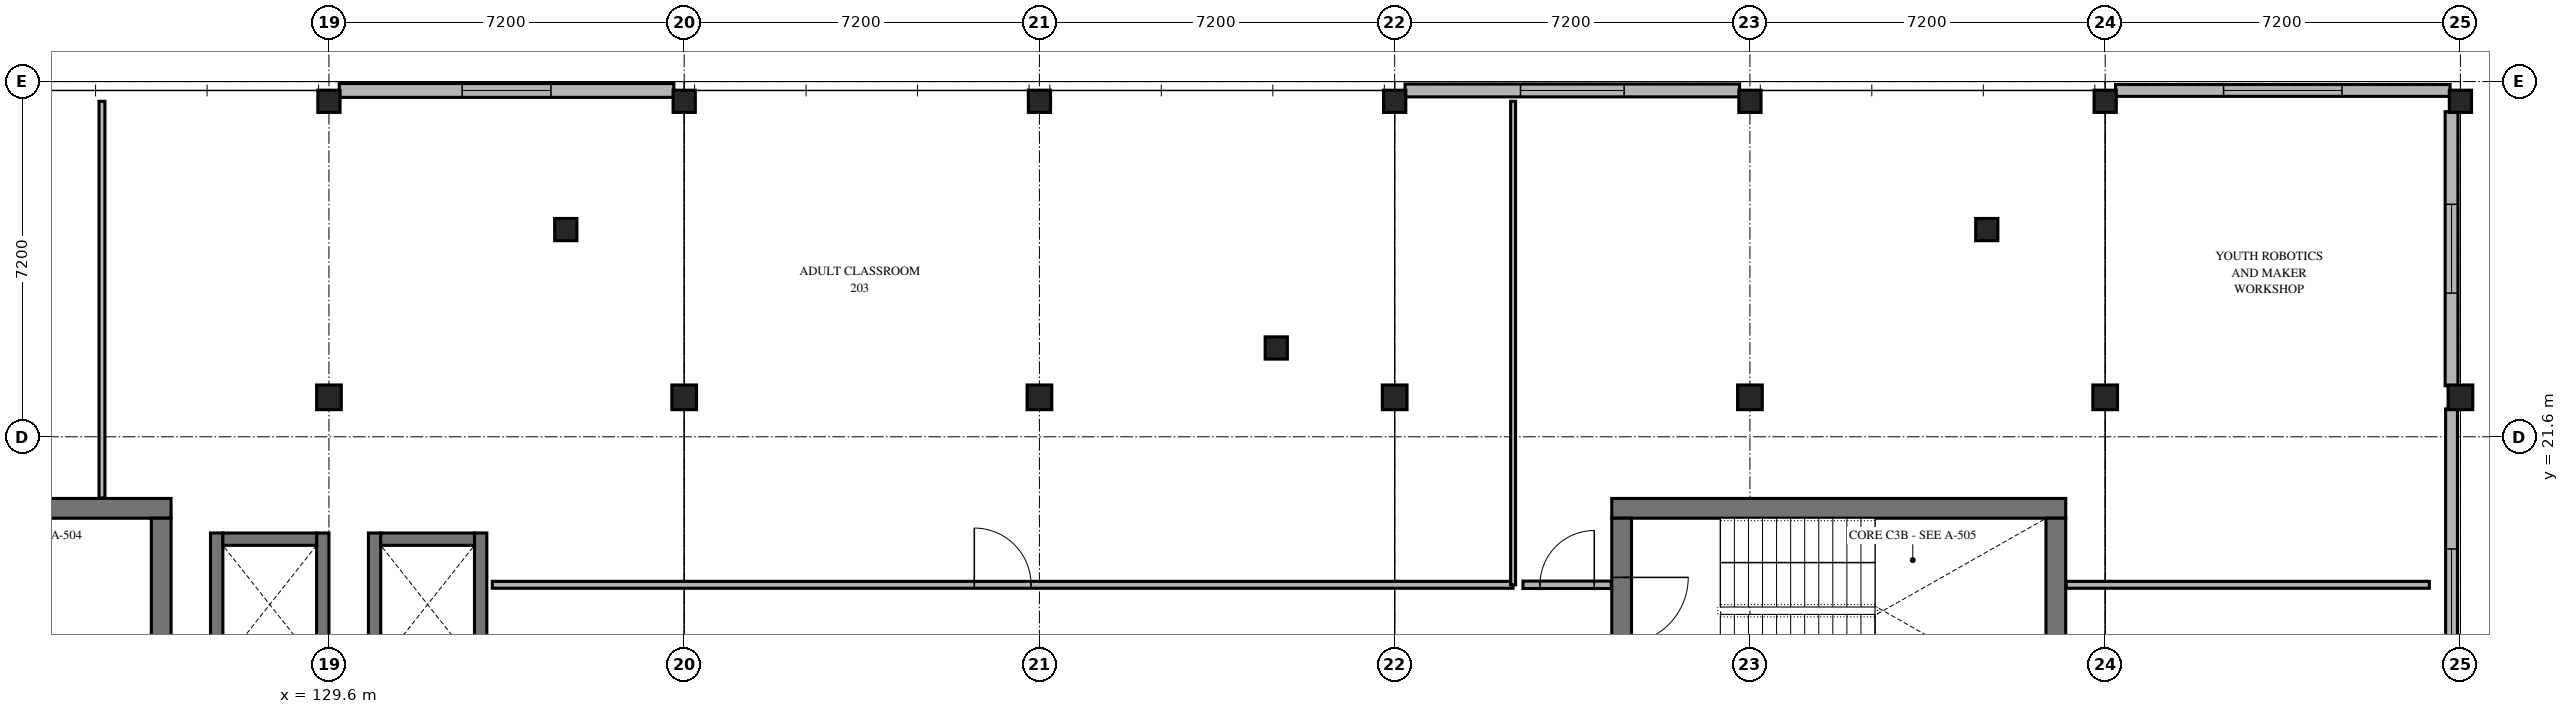
"""IFC4 building model, lengths in metres.
Left out: names, types, materials, properties, quantities, classifications, styles, units other than length and angle.
Written with IfcOpenShell. Run it as: python <this file> out.ifc"""

import sys

from ifc_helpers import new_model, si_unit, direction, frame, frame_2d, origin, origin_2d, place, context, subcontext, project, spatial, rectangle, extrude, element, fill, save


model = new_model("IFC4")
c1 = context("Model", 3, precision=1e-05, world=origin(), true_north=direction((0.0, 1.0)))
c2 = subcontext(c1, "Body", "Model", "MODEL_VIEW")
j1 = project(units=[si_unit("LENGTHUNIT", "METRE"), si_unit("PLANEANGLEUNIT", "RADIAN")], contexts=[c1])
p1 = place(None, origin())
s1 = spatial("IfcSite", under=j1, at=p1, CompositionType="ELEMENT")
p2 = place(p1, origin())
s2 = spatial("IfcBuilding", under=s1, at=p2, CompositionType="ELEMENT")
p3 = place(p2, frame((0.0, 0.0, 8.7)))
s3 = spatial("IfcBuildingStorey", under=s2, at=p3, CompositionType="ELEMENT", Elevation=8.7)
p4 = place(p3, frame((129.6, 22.4, 0.0), z_axis=(0.0, 0.0, 1.0), x_axis=(1.0, 0.0, 0.0)))
e1 = element("IfcColumn", 1, at=p4, inside=s3, PredefinedType="COLUMN", context=c2, shape_type="SweptSolid", body=[
    extrude(rectangle(XDim=0.5, YDim=0.5, at=origin_2d()), origin(), (0.0, 0.0, 1.0), 4.2),
])
p5 = place(p3, frame((129.6, 28.4, 0.0), z_axis=(0.0, 0.0, 1.0), x_axis=(1.0, 0.0, 0.0)))
e2 = element("IfcColumn", 2, at=p5, inside=s3, PredefinedType="COLUMN", context=c2, shape_type="SweptSolid", body=[
    extrude(rectangle(XDim=0.45, YDim=0.45, at=origin_2d()), origin(), (0.0, 0.0, 1.0), 4.2),
])
p6 = place(p3, frame((136.8, 22.4, 0.0), z_axis=(0.0, 0.0, 1.0), x_axis=(1.0, 0.0, 0.0)))
e3 = element("IfcColumn", 3, at=p6, inside=s3, PredefinedType="COLUMN", context=c2, shape_type="SweptSolid", body=[
    extrude(rectangle(XDim=0.5, YDim=0.5, at=origin_2d()), origin(), (0.0, 0.0, 1.0), 4.2),
])
p7 = place(p3, frame((136.8, 28.4, 0.0), z_axis=(0.0, 0.0, 1.0), x_axis=(1.0, 0.0, 0.0)))
e4 = element("IfcColumn", 4, at=p7, inside=s3, PredefinedType="COLUMN", context=c2, shape_type="SweptSolid", body=[
    extrude(rectangle(XDim=0.45, YDim=0.45, at=origin_2d()), origin(), (0.0, 0.0, 1.0), 4.2),
])
p8 = place(p3, frame((144.0, 22.4, 0.0), z_axis=(0.0, 0.0, 1.0), x_axis=(1.0, 0.0, 0.0)))
e5 = element("IfcColumn", 5, at=p8, inside=s3, PredefinedType="COLUMN", context=c2, shape_type="SweptSolid", body=[
    extrude(rectangle(XDim=0.5, YDim=0.5, at=origin_2d()), origin(), (0.0, 0.0, 1.0), 4.2),
])
p9 = place(p3, frame((144.0, 28.4, 0.0), z_axis=(0.0, 0.0, 1.0), x_axis=(1.0, 0.0, 0.0)))
e6 = element("IfcColumn", 6, at=p9, inside=s3, PredefinedType="COLUMN", context=c2, shape_type="SweptSolid", body=[
    extrude(rectangle(XDim=0.45, YDim=0.45, at=origin_2d()), origin(), (0.0, 0.0, 1.0), 4.2),
])
p10 = place(p3, frame((151.2, 22.4, 0.0), z_axis=(0.0, 0.0, 1.0), x_axis=(1.0, 0.0, 0.0)))
e7 = element("IfcColumn", 7, at=p10, inside=s3, PredefinedType="COLUMN", context=c2, shape_type="SweptSolid", body=[
    extrude(rectangle(XDim=0.5, YDim=0.5, at=origin_2d()), origin(), (0.0, 0.0, 1.0), 4.2),
])
p11 = place(p3, frame((151.2, 28.4, 0.0), z_axis=(0.0, 0.0, 1.0), x_axis=(1.0, 0.0, 0.0)))
e8 = element("IfcColumn", 8, at=p11, inside=s3, PredefinedType="COLUMN", context=c2, shape_type="SweptSolid", body=[
    extrude(rectangle(XDim=0.45, YDim=0.45, at=origin_2d()), origin(), (0.0, 0.0, 1.0), 4.2),
])
p12 = place(p3, frame((158.4, 22.4, 0.0), z_axis=(0.0, 0.0, 1.0), x_axis=(1.0, 0.0, 0.0)))
e9 = element("IfcColumn", 9, at=p12, inside=s3, PredefinedType="COLUMN", context=c2, shape_type="SweptSolid", body=[
    extrude(rectangle(XDim=0.5, YDim=0.5, at=origin_2d()), origin(), (0.0, 0.0, 1.0), 4.2),
])
p13 = place(p3, frame((158.4, 28.4, 0.0), z_axis=(0.0, 0.0, 1.0), x_axis=(1.0, 0.0, 0.0)))
e10 = element("IfcColumn", 10, at=p13, inside=s3, PredefinedType="COLUMN", context=c2, shape_type="SweptSolid", body=[
    extrude(rectangle(XDim=0.45, YDim=0.45, at=origin_2d()), origin(), (0.0, 0.0, 1.0), 4.2),
])
p14 = place(p3, frame((165.6, 22.4, 0.0), z_axis=(0.0, 0.0, 1.0), x_axis=(1.0, 0.0, 0.0)))
e11 = element("IfcColumn", 11, at=p14, inside=s3, PredefinedType="COLUMN", context=c2, shape_type="SweptSolid", body=[
    extrude(rectangle(XDim=0.5, YDim=0.5, at=origin_2d()), origin(), (0.0, 0.0, 1.0), 4.2),
])
p15 = place(p3, frame((165.6, 28.4, 0.0), z_axis=(0.0, 0.0, 1.0), x_axis=(1.0, 0.0, 0.0)))
e12 = element("IfcColumn", 12, at=p15, inside=s3, PredefinedType="COLUMN", context=c2, shape_type="SweptSolid", body=[
    extrude(rectangle(XDim=0.45, YDim=0.45, at=origin_2d()), origin(), (0.0, 0.0, 1.0), 4.2),
])
p16 = place(p3, frame((172.8, 22.4, 0.0), z_axis=(0.0, 0.0, 1.0), x_axis=(1.0, 0.0, 0.0)))
e13 = element("IfcColumn", 13, at=p16, inside=s3, PredefinedType="COLUMN", context=c2, shape_type="SweptSolid", body=[
    extrude(rectangle(XDim=0.5, YDim=0.5, at=origin_2d()), origin(), (0.0, 0.0, 1.0), 4.2),
])
for number, where, z_axis, x_axis in (
    (14, (172.8, 28.4, 0.0), (0.0, 0.0, 1.0), (1.0, 0.0, 0.0)),
    (15, (134.4, 25.8, 0.0), (0.0, 0.0, 1.0), (1.0, 0.0, 0.0)),
    (16, (148.8, 23.4, 0.0), (0.0, 0.0, 1.0), (1.0, 0.0, 0.0)),
    (17, (163.2, 25.8, 0.0), (0.0, 0.0, 1.0), (1.0, 0.0, 0.0)),
):
    element("IfcColumn", number, at=place(p3, frame(where, z_axis=z_axis, x_axis=x_axis)), inside=s3, PredefinedType="COLUMN", context=c2, shape_type="SweptSolid", body=[
        extrude(rectangle(XDim=0.45, YDim=0.45, at=origin_2d()), origin(), (0.0, 0.0, 1.0), 4.2),
    ])
p17 = place(p3, frame((172.62, 28.19, 0.0), z_axis=(0.0, 0.0, 1.0), x_axis=(0.0, -1.0, 0.0)))
e18 = element("IfcWall", 18, at=p17, inside=s3, PredefinedType="SOLIDWALL", context=c2, shape_type="SweptSolid", body=[
    extrude(rectangle(XDim=5.555, YDim=0.26, at=frame_2d((2.777, 0.0))), origin(), (0.0, 0.0, 1.0), 3.26),
])
p18 = place(p17, frame((1.877, 0.0, 0.9)))
e19 = element("IfcOpeningElement", 19, at=p18, cuts=e18, PredefinedType="OPENING", context=c2, shape_type="SweptSolid", body=[
    extrude(rectangle(XDim=1.8, YDim=1.2, at=frame_2d((0.9, 0.6))), frame((0.0, 0.14, 0.0), z_axis=(0.0, -1.0, 0.0), x_axis=(1.0, 0.0, 0.0)), (0.0, 0.0, 1.0), 0.28),
])
p19 = place(p3, frame((172.62, 22.165, 0.0), z_axis=(0.0, 0.0, 1.0), x_axis=(0.0, -1.0, 0.0)))
e20 = element("IfcWall", 20, at=p19, inside=s3, PredefinedType="SOLIDWALL", context=c2, shape_type="SweptSolid", body=[
    extrude(rectangle(XDim=7.777, YDim=0.24, at=frame_2d((3.889, 0.0))), origin(), (0.0, 0.0, 1.0), 3.21),
])
p20 = place(p19, frame((2.838, 0.0, 0.9)))
e21 = element("IfcOpeningElement", 21, at=p20, cuts=e20, PredefinedType="OPENING", context=c2, shape_type="SweptSolid", body=[
    extrude(rectangle(XDim=2.1, YDim=1.2, at=frame_2d((1.05, 0.6))), frame((0.0, 0.13, 0.0), z_axis=(0.0, -1.0, 0.0), x_axis=(1.0, 0.0, 0.0)), (0.0, 0.0, 1.0), 0.26),
])
p21 = place(p3, frame((129.81, 28.62, 0.0), z_axis=(0.0, 0.0, 1.0), x_axis=(1.0, 0.0, 0.0)))
e22 = element("IfcWall", 22, at=p21, inside=s3, PredefinedType="SOLIDWALL", context=c2, shape_type="SweptSolid", body=[
    extrude(rectangle(XDim=6.78, YDim=0.28, at=frame_2d((3.39, 0.0))), origin(), (0.0, 0.0, 1.0), 3.96),
])
p22 = place(p21, frame((2.49, 0.0, 0.9)))
e23 = element("IfcOpeningElement", 23, at=p22, cuts=e22, PredefinedType="OPENING", context=c2, shape_type="SweptSolid", body=[
    extrude(rectangle(XDim=1.8, YDim=1.35, at=frame_2d((0.9, 0.675))), frame((0.0, 0.15, 0.0), z_axis=(0.0, -1.0, 0.0), x_axis=(1.0, 0.0, 0.0)), (0.0, 0.0, 1.0), 0.3),
])
p23 = place(p3, frame((151.41, 28.62, 0.0), z_axis=(0.0, 0.0, 1.0), x_axis=(1.0, 0.0, 0.0)))
e24 = element("IfcWall", 24, at=p23, inside=s3, PredefinedType="SOLIDWALL", context=c2, shape_type="SweptSolid", body=[
    extrude(rectangle(XDim=6.78, YDim=0.26, at=frame_2d((3.39, 0.0))), origin(), (0.0, 0.0, 1.0), 3.96),
])
p24 = place(p23, frame((2.34, 0.0, 0.9)))
e25 = element("IfcOpeningElement", 25, at=p24, cuts=e24, PredefinedType="OPENING", context=c2, shape_type="SweptSolid", body=[
    extrude(rectangle(XDim=2.1, YDim=1.35, at=frame_2d((1.05, 0.675))), frame((0.0, 0.14, 0.0), z_axis=(0.0, -1.0, 0.0), x_axis=(1.0, 0.0, 0.0)), (0.0, 0.0, 1.0), 0.28),
])
p25 = place(p3, frame((165.81, 28.62, 0.0), z_axis=(0.0, 0.0, 1.0), x_axis=(1.0, 0.0, 0.0)))
e26 = element("IfcWall", 26, at=p25, inside=s3, PredefinedType="SOLIDWALL", context=c2, shape_type="SweptSolid", body=[
    extrude(rectangle(XDim=6.78, YDim=0.24, at=frame_2d((3.39, 0.0))), origin(), (0.0, 0.0, 1.0), 3.96),
])
p26 = place(p25, frame((2.19, 0.0, 0.9)))
e27 = element("IfcOpeningElement", 27, at=p26, cuts=e26, PredefinedType="OPENING", context=c2, shape_type="SweptSolid", body=[
    extrude(rectangle(XDim=2.4, YDim=1.35, at=frame_2d((1.2, 0.675))), frame((0.0, 0.13, 0.0), z_axis=(0.0, -1.0, 0.0), x_axis=(1.0, 0.0, 0.0)), (0.0, 0.0, 1.0), 0.26),
])
p27 = place(p3, frame((126.4, 20.15, 0.0), z_axis=(0.0, 0.0, 1.0), x_axis=(-1.0, 0.0, 0.0)))
e28 = element("IfcWall", 28, at=p27, inside=s3, PredefinedType="SHEAR", context=c2, shape_type="SweptSolid", body=[
    extrude(rectangle(XDim=9.2, YDim=0.4, at=frame_2d((4.6, 0.0))), origin(), (0.0, 0.0, 1.0), 3.96),
])
p28 = place(p3, frame((126.2, 16.2, 0.0), z_axis=(0.0, 0.0, 1.0), x_axis=(0.0, 1.0, 0.0)))
e29 = element("IfcWall", 29, at=p28, inside=s3, PredefinedType="SHEAR", context=c2, shape_type="SweptSolid", body=[
    extrude(rectangle(XDim=3.75, YDim=0.4, at=frame_2d((1.875, 0.0))), origin(), (0.0, 0.0, 1.0), 3.96),
])
p29 = place(p3, frame((164.8, 20.15, 0.0), z_axis=(0.0, 0.0, 1.0), x_axis=(-1.0, 0.0, 0.0)))
e30 = element("IfcWall", 30, at=p29, inside=s3, PredefinedType="SHEAR", context=c2, shape_type="SweptSolid", body=[
    extrude(rectangle(XDim=9.2, YDim=0.4, at=frame_2d((4.6, 0.0))), origin(), (0.0, 0.0, 1.0), 3.96),
])
p30 = place(p3, frame((164.6, 16.2, 0.0), z_axis=(0.0, 0.0, 1.0), x_axis=(0.0, 1.0, 0.0)))
e31 = element("IfcWall", 31, at=p30, inside=s3, PredefinedType="SHEAR", context=c2, shape_type="SweptSolid", body=[
    extrude(rectangle(XDim=3.75, YDim=0.4, at=frame_2d((1.875, 0.0))), origin(), (0.0, 0.0, 1.0), 3.96),
])
p31 = place(p3, frame((155.8, 19.95, 0.0), z_axis=(0.0, 0.0, 1.0), x_axis=(0.0, -1.0, 0.0)))
e32 = element("IfcWall", 32, at=p31, inside=s3, PredefinedType="SHEAR", context=c2, shape_type="SweptSolid", body=[
    extrude(rectangle(XDim=3.75, YDim=0.4, at=frame_2d((1.875, 0.0))), origin(), (0.0, 0.0, 1.0), 3.96),
])
p32 = place(p31, frame((1.2, 0.0, 0.0)))
e33 = element("IfcOpeningElement", 33, at=p32, cuts=e32, PredefinedType="OPENING", context=c2, shape_type="SweptSolid", body=[
    extrude(rectangle(XDim=1.35, YDim=2.2, at=frame_2d((0.675, 1.1))), frame((0.0, 0.21, 0.0), z_axis=(0.0, -1.0, 0.0), x_axis=(1.0, 0.0, 0.0)), (0.0, 0.0, 1.0), 0.42),
])
for number, where, z_axis, x_axis in (
    (34, (127.325, 16.75, 0.0), (0.0, 0.0, 1.0), (0.0, 1.0, 0.0)),
    (35, (129.475, 19.65, 0.0), (0.0, 0.0, 1.0), (0.0, -1.0, 0.0)),
):
    element("IfcWall", number, at=place(p3, frame(where, z_axis=z_axis, x_axis=x_axis)), inside=s3, PredefinedType="SOLIDWALL", context=c2, shape_type="SweptSolid", body=[
        extrude(rectangle(XDim=2.9, YDim=0.25, at=frame_2d((1.45, 0.0))), origin(), (0.0, 0.0, 1.0), 3.96),
    ])
p33 = place(p3, frame((129.35, 19.525, 0.0), z_axis=(0.0, 0.0, 1.0), x_axis=(-1.0, 0.0, 0.0)))
e36 = element("IfcWall", 36, at=p33, inside=s3, PredefinedType="SOLIDWALL", context=c2, shape_type="SweptSolid", body=[
    extrude(rectangle(XDim=1.9, YDim=0.25, at=frame_2d((0.95, 0.0))), origin(), (0.0, 0.0, 1.0), 3.96),
])
for number, where, z_axis, x_axis in (
    (37, (130.525, 16.75, 0.0), (0.0, 0.0, 1.0), (0.0, 1.0, 0.0)),
    (38, (132.675, 19.65, 0.0), (0.0, 0.0, 1.0), (0.0, -1.0, 0.0)),
):
    element("IfcWall", number, at=place(p3, frame(where, z_axis=z_axis, x_axis=x_axis)), inside=s3, PredefinedType="SOLIDWALL", context=c2, shape_type="SweptSolid", body=[
        extrude(rectangle(XDim=2.9, YDim=0.25, at=frame_2d((1.45, 0.0))), origin(), (0.0, 0.0, 1.0), 3.96),
    ])
p34 = place(p3, frame((132.55, 19.525, 0.0), z_axis=(0.0, 0.0, 1.0), x_axis=(-1.0, 0.0, 0.0)))
e39 = element("IfcWall", 39, at=p34, inside=s3, PredefinedType="SOLIDWALL", context=c2, shape_type="SweptSolid", body=[
    extrude(rectangle(XDim=1.9, YDim=0.25, at=frame_2d((0.95, 0.0))), origin(), (0.0, 0.0, 1.0), 3.96),
])
p35 = place(p3, frame((132.91, 18.6, 0.0), z_axis=(0.0, 0.0, 1.0), x_axis=(1.0, 0.0, 0.0)))
e40 = element("IfcWall", 40, at=p35, inside=s3, PredefinedType="PARTITIONING", context=c2, shape_type="SweptSolid", body=[
    extrude(rectangle(XDim=20.69, YDim=0.14, at=frame_2d((10.345, 0.0))), origin(), (0.0, 0.0, 1.0), 3.21),
])
p36 = place(p35, frame((9.77, 0.0, 0.0)))
e41 = element("IfcOpeningElement", 41, at=p36, cuts=e40, PredefinedType="OPENING", context=c2, shape_type="SweptSolid", body=[
    extrude(rectangle(XDim=1.15, YDim=2.15, at=frame_2d((0.575, 1.075))), frame((0.0, 0.08, 0.0), z_axis=(0.0, -1.0, 0.0), x_axis=(1.0, 0.0, 0.0)), (0.0, 0.0, 1.0), 0.16),
])
p37 = place(p3, frame((125.0, 28.4, 0.0), z_axis=(0.0, 0.0, 1.0), x_axis=(0.0, -1.0, 0.0)))
e42 = element("IfcWall", 42, at=p37, inside=s3, PredefinedType="PARTITIONING", context=c2, shape_type="SweptSolid", body=[
    extrude(rectangle(XDim=8.04, YDim=0.12, at=frame_2d((4.02, 0.0))), origin(), (0.0, 0.0, 1.0), 3.21),
])
p38 = place(p3, frame((153.6, 18.6, 0.0), z_axis=(0.0, 0.0, 1.0), x_axis=(0.0, 1.0, 0.0)))
e43 = element("IfcWall", 43, at=p38, inside=s3, PredefinedType="PARTITIONING", context=c2, shape_type="SweptSolid", body=[
    extrude(rectangle(XDim=9.8, YDim=0.1, at=frame_2d((4.9, 0.0))), origin(), (0.0, 0.0, 1.0), 3.16),
])
p39 = place(p3, frame((153.8, 18.6, 0.0), z_axis=(0.0, 0.0, 1.0), x_axis=(1.0, 0.0, 0.0)))
e44 = element("IfcWall", 44, at=p39, inside=s3, PredefinedType="PARTITIONING", context=c2, shape_type="SweptSolid", body=[
    extrude(rectangle(XDim=1.79, YDim=0.15, at=frame_2d((0.895, 0.0))), origin(), (0.0, 0.0, 1.0), 3.96),
])
p40 = place(p39, frame((0.345, 0.0, 0.0)))
e45 = element("IfcOpeningElement", 45, at=p40, cuts=e44, PredefinedType="OPENING", context=c2, shape_type="SweptSolid", body=[
    extrude(rectangle(XDim=1.1, YDim=2.15, at=frame_2d((0.55, 1.075))), frame((0.0, 0.085, 0.0), z_axis=(0.0, -1.0, 0.0), x_axis=(1.0, 0.0, 0.0)), (0.0, 0.0, 1.0), 0.17),
])
p41 = place(p3, frame((164.81, 18.6, 0.0), z_axis=(0.0, 0.0, 1.0), x_axis=(1.0, 0.0, 0.0)))
e46 = element("IfcWall", 46, at=p41, inside=s3, PredefinedType="PARTITIONING", context=c2, shape_type="SweptSolid", body=[
    extrude(rectangle(XDim=7.36, YDim=0.14, at=frame_2d((3.68, 0.0))), origin(), (0.0, 0.0, 1.0), 3.31),
])
p42 = place(p18, origin())
e47 = element("IfcWindow", 47, at=p42, inside=s3, PartitioningType="SINGLE_PANEL", PredefinedType="WINDOW", context=c2, shape_type="SweptSolid", body=[
    extrude(rectangle(XDim=1.8, YDim=1.2, at=frame_2d((0.9, 0.6))), frame((0.0, 0.03, 0.0), z_axis=(0.0, -1.0, 0.0), x_axis=(1.0, 0.0, 0.0)), (0.0, 0.0, 1.0), 0.06),
])
fill(e19, e47)
p43 = place(p20, origin())
e48 = element("IfcWindow", 48, at=p43, inside=s3, PartitioningType="SINGLE_PANEL", PredefinedType="WINDOW", context=c2, shape_type="SweptSolid", body=[
    extrude(rectangle(XDim=2.1, YDim=1.2, at=frame_2d((1.05, 0.6))), frame((0.0, 0.03, 0.0), z_axis=(0.0, -1.0, 0.0), x_axis=(1.0, 0.0, 0.0)), (0.0, 0.0, 1.0), 0.06),
])
fill(e21, e48)
p44 = place(p22, origin())
e49 = element("IfcWindow", 49, at=p44, inside=s3, PartitioningType="SINGLE_PANEL", PredefinedType="WINDOW", context=c2, shape_type="SweptSolid", body=[
    extrude(rectangle(XDim=1.8, YDim=1.35, at=frame_2d((0.9, 0.675))), frame((0.0, 0.03, 0.0), z_axis=(0.0, -1.0, 0.0), x_axis=(1.0, 0.0, 0.0)), (0.0, 0.0, 1.0), 0.06),
])
fill(e23, e49)
p45 = place(p24, origin())
e50 = element("IfcWindow", 50, at=p45, inside=s3, PartitioningType="SINGLE_PANEL", PredefinedType="WINDOW", context=c2, shape_type="SweptSolid", body=[
    extrude(rectangle(XDim=2.1, YDim=1.35, at=frame_2d((1.05, 0.675))), frame((0.0, 0.03, 0.0), z_axis=(0.0, -1.0, 0.0), x_axis=(1.0, 0.0, 0.0)), (0.0, 0.0, 1.0), 0.06),
])
fill(e25, e50)
p46 = place(p26, origin())
e51 = element("IfcWindow", 51, at=p46, inside=s3, PartitioningType="SINGLE_PANEL", PredefinedType="WINDOW", context=c2, shape_type="SweptSolid", body=[
    extrude(rectangle(XDim=2.4, YDim=1.35, at=frame_2d((1.2, 0.675))), frame((0.0, 0.03, 0.0), z_axis=(0.0, -1.0, 0.0), x_axis=(1.0, 0.0, 0.0)), (0.0, 0.0, 1.0), 0.06),
])
fill(e27, e51)
p47 = place(p32, origin())
e52 = element("IfcDoor", 52, at=p47, inside=s3, OperationType="SINGLE_SWING_LEFT", PredefinedType="DOOR", context=c2, shape_type="SweptSolid", body=[
    extrude(rectangle(XDim=1.35, YDim=2.2, at=frame_2d((0.675, 1.1))), frame((0.0, 0.025, 0.0), z_axis=(0.0, -1.0, 0.0), x_axis=(1.0, 0.0, 0.0)), (0.0, 0.0, 1.0), 0.05),
])
fill(e33, e52)
p48 = place(p36, origin())
e53 = element("IfcDoor", 53, at=p48, inside=s3, OperationType="SINGLE_SWING_LEFT", PredefinedType="DOOR", context=c2, shape_type="SweptSolid", body=[
    extrude(rectangle(XDim=1.15, YDim=2.15, at=frame_2d((0.575, 1.075))), frame((0.0, 0.025, 0.0), z_axis=(0.0, -1.0, 0.0), x_axis=(1.0, 0.0, 0.0)), (0.0, 0.0, 1.0), 0.05),
])
fill(e41, e53)
p49 = place(p40, origin())
e54 = element("IfcDoor", 54, at=p49, inside=s3, OperationType="SINGLE_SWING_RIGHT", PredefinedType="DOOR", context=c2, shape_type="SweptSolid", body=[
    extrude(rectangle(XDim=1.1, YDim=2.15, at=frame_2d((0.55, 1.075))), frame((0.0, 0.025, 0.0), z_axis=(0.0, -1.0, 0.0), x_axis=(1.0, 0.0, 0.0)), (0.0, 0.0, 1.0), 0.05),
])
fill(e45, e54)
save(model, sys.argv[1])
